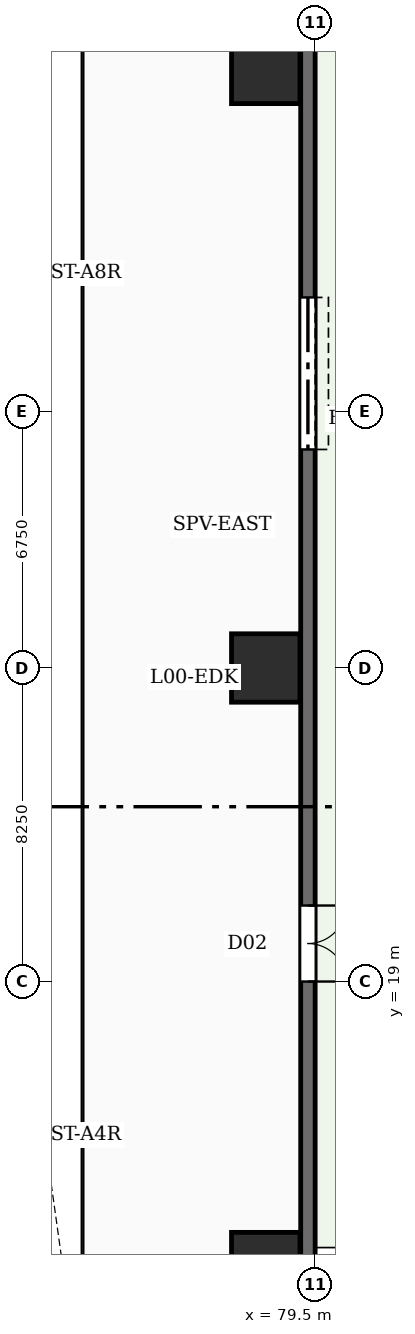
"""IFC4 building model, lengths in metres.
Left out: names, types, materials, properties, quantities, classifications, styles, units other than length and angle.
Written with IfcOpenShell. Run it as: python <this file> out.ifc"""

import sys

from ifc_helpers import new_model, si_unit, direction, frame, frame_2d, origin, origin_2d, place, context, subcontext, project, spatial, rectangle, circle, extrude, element, fill, save


model = new_model("IFC4")
c1 = context("Model", 3, precision=1e-05, world=origin(), true_north=direction((0.0, 1.0)))
c2 = subcontext(c1, "Body", "Model", "MODEL_VIEW")
j1 = project(units=[si_unit("LENGTHUNIT", "METRE"), si_unit("PLANEANGLEUNIT", "RADIAN")], contexts=[c1])
p1 = place(None, origin())
s1 = spatial("IfcSite", under=j1, at=p1, CompositionType="ELEMENT")
p2 = place(p1, origin())
s2 = spatial("IfcBuilding", under=s1, at=p2, CompositionType="ELEMENT")
p3 = place(p2, origin())
s3 = spatial("IfcBuildingStorey", under=s2, at=p3, CompositionType="ELEMENT", Elevation=0.0)
for number, where, z_axis, x_axis in (
    (1, (78.2, 11.5, -0.45), (0.0, 0.0, 1.0), (1.0, 0.0, 0.0)),
    (2, (78.2, 27.25, -0.45), (0.0, 0.0, 1.0), (1.0, 0.0, 0.0)),
    (3, (78.2, 43.0, -0.45), (0.0, 0.0, 1.0), (1.0, 0.0, 0.0)),
):
    element("IfcColumn", number, at=place(p3, frame(where, z_axis=z_axis, x_axis=x_axis)), inside=s3, PredefinedType="COLUMN", context=c2, shape_type="SweptSolid", body=[
        extrude(circle(Radius=0.9, at=origin_2d()), origin(), (0.0, 0.0, 1.0), 8.1),
    ])
p4 = place(p3, frame((79.31, 49.1, 0.0), z_axis=(0.0, 0.0, 1.0), x_axis=(0.0, -1.0, 0.0)))
e4 = element("IfcWall", 4, at=p4, inside=s3, PredefinedType="SOLIDWALL", context=c2, shape_type="SweptSolid", body=[
    extrude(rectangle(XDim=43.7, YDim=0.38, at=frame_2d((21.85, 0.0))), origin(), (0.0, 0.0, 1.0), 7.65),
])
p5 = place(p4, frame((12.1, 0.0, 0.0)))
e5 = element("IfcOpeningElement", 5, at=p5, cuts=e4, PredefinedType="OPENING", context=c2, shape_type="SweptSolid", body=[
    extrude(rectangle(XDim=4.0, YDim=4.4, at=frame_2d((2.0, 2.2))), frame((0.0, 0.2, 0.0), z_axis=(0.0, -1.0, 0.0), x_axis=(1.0, 0.0, 0.0)), (0.0, 0.0, 1.0), 0.4),
])
p6 = place(p4, frame((28.1, 0.0, 0.0)))
e6 = element("IfcOpeningElement", 6, at=p6, cuts=e4, PredefinedType="OPENING", context=c2, shape_type="SweptSolid", body=[
    extrude(rectangle(XDim=2.0, YDim=2.3, at=frame_2d((1.0, 1.15))), frame((0.0, 0.2, 0.0), z_axis=(0.0, -1.0, 0.0), x_axis=(1.0, 0.0, 0.0)), (0.0, 0.0, 1.0), 0.4),
])
p7 = place(p5, origin())
e7 = element("IfcDoor", 7, at=p7, inside=s3, OperationType="ROLLINGUP", PredefinedType="GATE", context=c2, shape_type="SweptSolid", body=[
    extrude(rectangle(XDim=4.0, YDim=4.4, at=frame_2d((2.0, 2.2))), frame((0.0, 0.025, 0.0), z_axis=(0.0, -1.0, 0.0), x_axis=(1.0, 0.0, 0.0)), (0.0, 0.0, 1.0), 0.05),
])
fill(e5, e7)
p8 = place(p6, origin())
e8 = element("IfcDoor", 8, at=p8, inside=s3, OperationType="DOUBLE_DOOR_SINGLE_SWING", PredefinedType="DOOR", context=c2, shape_type="SweptSolid", body=[
    extrude(rectangle(XDim=2.0, YDim=2.3, at=frame_2d((1.0, 1.15))), frame((0.0, 0.025, 0.0), z_axis=(0.0, -1.0, 0.0), x_axis=(1.0, 0.0, 0.0)), (0.0, 0.0, 1.0), 0.05),
])
fill(e6, e8)
save(model, sys.argv[1])
